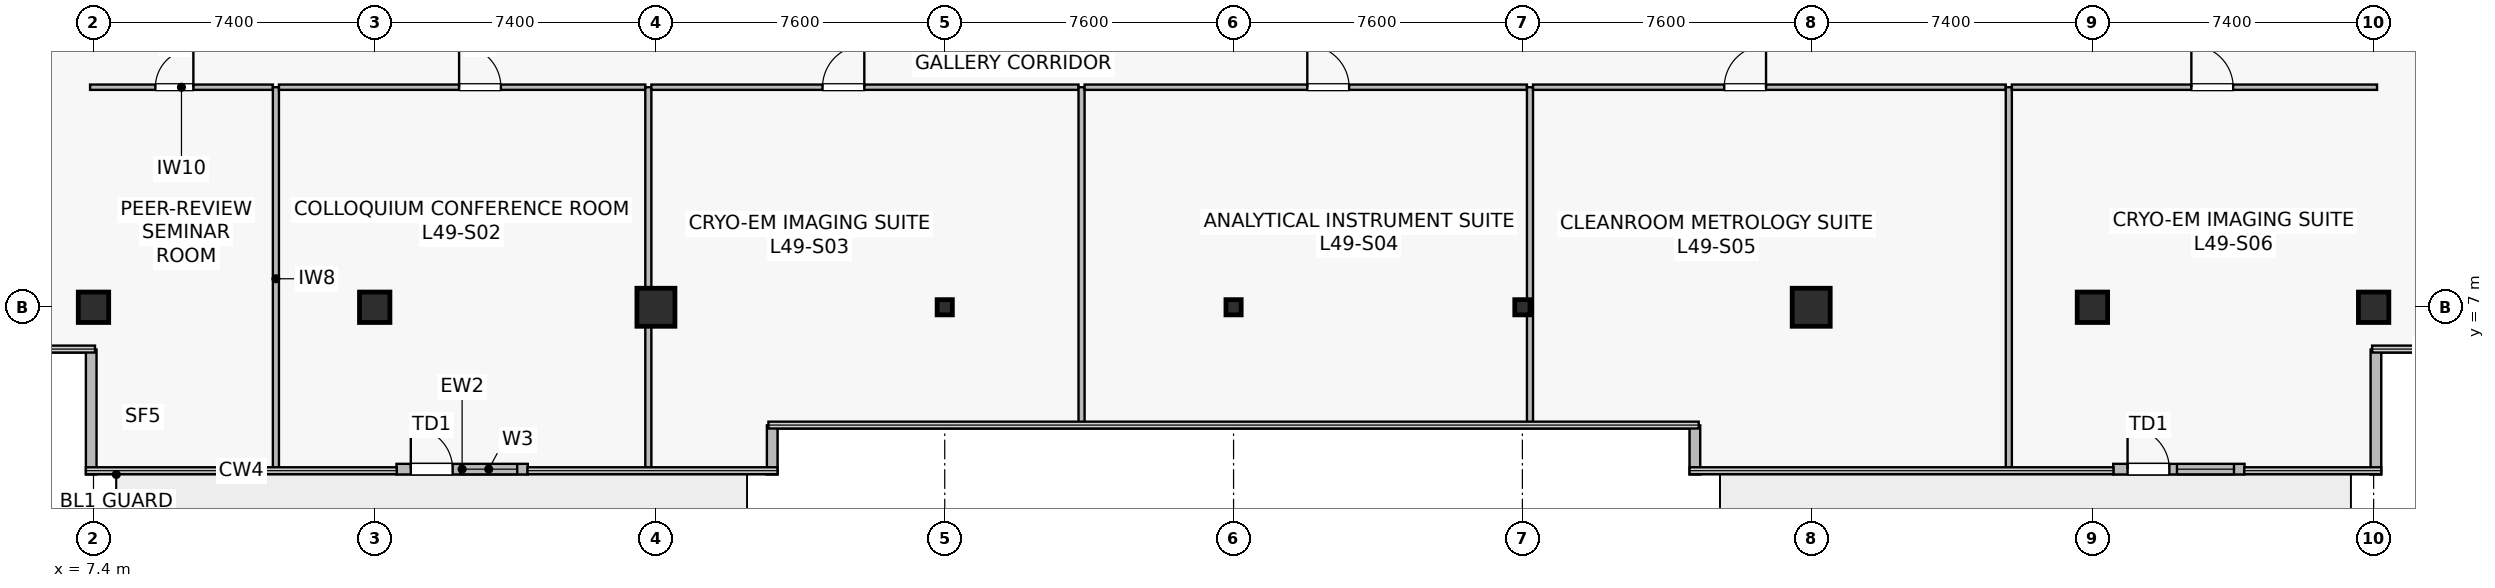
"""IFC4 building model, lengths in metres.
Left out: names, types, materials, properties, quantities, classifications, styles, units other than length and angle.
Written with IfcOpenShell. Run it as: python <this file> out.ifc"""

import sys

from ifc_helpers import new_model, si_unit, direction, frame, frame_2d, origin, origin_2d, place, context, subcontext, project, spatial, rectangle, hollow_rectangle, extrude, source, transform, mapped, element, fill, save


model = new_model("IFC4")
c1 = context("Model", 3, precision=1e-05, world=origin(), true_north=direction((0.0, 1.0)))
c2 = subcontext(c1, "Body", "Model", "MODEL_VIEW")
j1 = project(units=[si_unit("LENGTHUNIT", "METRE"), si_unit("PLANEANGLEUNIT", "RADIAN")], contexts=[c1])
p1 = place(None, origin())
s1 = spatial("IfcSite", under=j1, at=p1, CompositionType="ELEMENT")
p2 = place(p1, origin())
s2 = spatial("IfcBuilding", under=s1, at=p2, CompositionType="ELEMENT")
p3 = place(p2, frame((0.0, 0.0, 205.5)))
s3 = spatial("IfcBuildingStorey", under=s2, at=p3, CompositionType="ELEMENT", Elevation=205.5)
m1 = source(origin(), c2, "Body", "SweptSolid", [
    extrude(rectangle(XDim=0.8, YDim=0.8, at=origin_2d()), origin(), (0.0, 0.0, 1.0), 4.1),
])
p4 = place(p3, frame((14.8, 7.0, 0.0), z_axis=(0.0, 0.0, 1.0), x_axis=(1.0, 0.0, 0.0)))
e1 = element("IfcColumn", 1, at=p4, inside=s3, PredefinedType="COLUMN", context=c2, shape_type="MappedRepresentation", body=[
    mapped(m1, transform((0.0, 0.0, 0.0), scale=1.0)),
])
m2 = source(origin(), c2, "Body", "SweptSolid", [
    extrude(rectangle(XDim=1.0, YDim=1.0, at=origin_2d()), origin(), (0.0, 0.0, 1.0), 4.1),
])
for number, where, z_axis, x_axis in (
    (2, (22.2, 7.0, 0.0), (0.0, 0.0, 1.0), (1.0, 0.0, 0.0)),
    (3, (52.6, 7.0, 0.0), (0.0, 0.0, 1.0), (1.0, 0.0, 0.0)),
):
    element("IfcColumn", number, at=place(p3, frame(where, z_axis=z_axis, x_axis=x_axis)), inside=s3, PredefinedType="COLUMN", context=c2, shape_type="MappedRepresentation", body=[
        mapped(m2, transform((0.0, 0.0, 0.0), scale=1.0)),
    ])
for number, where, z_axis, x_axis in (
    (4, (60.0, 7.0, 0.0), (0.0, 0.0, 1.0), (1.0, 0.0, 0.0)),
    (5, (7.4, 7.0, 0.0), (0.0, 0.0, 1.0), (1.0, 0.0, 0.0)),
    (6, (67.4, 7.0, 0.0), (0.0, 0.0, 1.0), (1.0, 0.0, 0.0)),
):
    element("IfcColumn", number, at=place(p3, frame(where, z_axis=z_axis, x_axis=x_axis)), inside=s3, PredefinedType="COLUMN", context=c2, shape_type="MappedRepresentation", body=[
        mapped(m1, transform((0.0, 0.0, 0.0), scale=1.0)),
    ])
m3 = source(origin(), c2, "Body", "SweptSolid", [
    extrude(hollow_rectangle(XDim=0.4, YDim=0.4, WallThickness=0.019, at=origin_2d()), origin(), (0.0, 0.0, 1.0), 4.1),
])
for number, where, z_axis, x_axis in (
    (7, (29.8, 7.0, 0.0), (0.0, 0.0, 1.0), (1.0, 0.0, 0.0)),
    (8, (37.4, 7.0, 0.0), (0.0, 0.0, 1.0), (1.0, 0.0, 0.0)),
    (9, (45.0, 7.0, 0.0), (0.0, 0.0, 1.0), (1.0, 0.0, 0.0)),
):
    element("IfcColumn", number, at=place(p3, frame(where, z_axis=z_axis, x_axis=x_axis)), inside=s3, PredefinedType="COLUMN", context=c2, shape_type="MappedRepresentation", body=[
        mapped(m3, transform((0.0, 0.0, 0.0), scale=1.0)),
    ])
p5 = place(p3, frame((15.372, 2.74, 0.0), z_axis=(0.0, 0.0, 1.0), x_axis=(1.0, 0.0, 0.0)))
e10 = element("IfcWall", 10, at=p5, inside=s3, PredefinedType="STANDARD", context=c2, shape_type="SweptSolid", body=[
    extrude(rectangle(XDim=3.456, YDim=0.28, at=frame_2d((1.728, 0.0))), origin(), (0.0, 0.0, 1.0), 3.8),
])
p6 = place(p5, frame((0.378, 0.0, 0.0)))
e11 = element("IfcOpeningElement", 11, at=p6, cuts=e10, PredefinedType="OPENING", context=c2, shape_type="SweptSolid", body=[
    extrude(rectangle(XDim=1.1, YDim=2.2, at=frame_2d((0.55, 1.1))), frame((0.0, 0.15, 0.0), z_axis=(0.0, -1.0, 0.0), x_axis=(1.0, 0.0, 0.0)), (0.0, 0.0, 1.0), 0.3),
])
p7 = place(p5, frame((1.678, 0.0, 0.9)))
e12 = element("IfcOpeningElement", 12, at=p7, cuts=e10, PredefinedType="OPENING", context=c2, shape_type="SweptSolid", body=[
    extrude(rectangle(XDim=1.5, YDim=2.2, at=frame_2d((0.75, 1.1))), frame((0.0, 0.15, 0.0), z_axis=(0.0, -1.0, 0.0), x_axis=(1.0, 0.0, 0.0)), (0.0, 0.0, 1.0), 0.3),
])
p8 = place(p3, frame((60.547, 2.74, 0.0), z_axis=(0.0, 0.0, 1.0), x_axis=(1.0, 0.0, 0.0)))
e13 = element("IfcWall", 13, at=p8, inside=s3, PredefinedType="STANDARD", context=c2, shape_type="SweptSolid", body=[
    extrude(rectangle(XDim=3.456, YDim=0.28, at=frame_2d((1.728, 0.0))), origin(), (0.0, 0.0, 1.0), 3.8),
])
p9 = place(p8, frame((0.378, 0.0, 0.0)))
e14 = element("IfcOpeningElement", 14, at=p9, cuts=e13, PredefinedType="OPENING", context=c2, shape_type="SweptSolid", body=[
    extrude(rectangle(XDim=1.1, YDim=2.2, at=frame_2d((0.55, 1.1))), frame((0.0, 0.15, 0.0), z_axis=(0.0, -1.0, 0.0), x_axis=(1.0, 0.0, 0.0)), (0.0, 0.0, 1.0), 0.3),
])
p10 = place(p8, frame((1.678, 0.0, 0.9)))
e15 = element("IfcOpeningElement", 15, at=p10, cuts=e13, PredefinedType="OPENING", context=c2, shape_type="SweptSolid", body=[
    extrude(rectangle(XDim=1.5, YDim=2.2, at=frame_2d((0.75, 1.1))), frame((0.0, 0.15, 0.0), z_axis=(0.0, -1.0, 0.0), x_axis=(1.0, 0.0, 0.0)), (0.0, 0.0, 1.0), 0.3),
])
for number, where, z_axis, x_axis in (
    (16, (25.26, 2.6, 0.0), (0.0, 0.0, 1.0), (0.0, 1.0, 0.0)),
    (17, (49.54, 3.893, 0.0), (0.0, 0.0, 1.0), (0.0, -1.0, 0.0)),
):
    element("IfcWall", number, at=place(p3, frame(where, z_axis=z_axis, x_axis=x_axis)), inside=s3, PredefinedType="STANDARD", context=c2, shape_type="SweptSolid", body=[
        extrude(rectangle(XDim=1.293, YDim=0.28, at=frame_2d((0.646, 0.0))), origin(), (0.0, 0.0, 1.0), 3.8),
    ])
for number, where, z_axis, x_axis in (
    (18, (67.46, 2.6, 0.0), (0.0, 0.0, 1.0), (0.0, 1.0, 0.0)),
    (19, (7.34, 5.888, 0.0), (0.0, 0.0, 1.0), (0.0, -1.0, 0.0)),
):
    element("IfcWall", number, at=place(p3, frame(where, z_axis=z_axis, x_axis=x_axis)), inside=s3, PredefinedType="STANDARD", context=c2, shape_type="SweptSolid", body=[
        extrude(rectangle(XDim=3.288, YDim=0.28, at=frame_2d((1.644, 0.0))), origin(), (0.0, 0.0, 1.0), 3.8),
    ])
p11 = place(p3, frame((7.31, 12.79, 0.0), z_axis=(0.0, 0.0, 1.0), x_axis=(1.0, 0.0, 0.0)))
e20 = element("IfcWall", 20, at=p11, inside=s3, PredefinedType="PARTITIONING", context=c2, shape_type="SweptSolid", body=[
    extrude(rectangle(XDim=4.81, YDim=0.14, at=frame_2d((2.405, 0.0))), origin(), (0.0, 0.0, 1.0), 3.335),
])
p12 = place(p11, frame((1.719, 0.0, 0.0)))
e21 = element("IfcOpeningElement", 21, at=p12, cuts=e20, PredefinedType="OPENING", context=c2, shape_type="SweptSolid", body=[
    extrude(rectangle(XDim=1.0, YDim=2.15, at=frame_2d((0.5, 1.075))), frame((0.0, 0.08, 0.0), z_axis=(0.0, -1.0, 0.0), x_axis=(1.0, 0.0, 0.0)), (0.0, 0.0, 1.0), 0.16),
])
p13 = place(p3, frame((12.2, 2.71, 0.0), z_axis=(0.0, 0.0, 1.0), x_axis=(0.0, 1.0, 0.0)))
e22 = element("IfcWall", 22, at=p13, inside=s3, PredefinedType="PARTITIONING", context=c2, shape_type="SweptSolid", body=[
    extrude(rectangle(XDim=10.08, YDim=0.16, at=frame_2d((5.04, 0.0))), origin(), (0.0, 0.0, 1.0), 3.135),
])
p14 = place(p3, frame((12.28, 12.79, 0.0), z_axis=(0.0, 0.0, 1.0), x_axis=(1.0, 0.0, 0.0)))
e23 = element("IfcWall", 23, at=p14, inside=s3, PredefinedType="PARTITIONING", context=c2, shape_type="SweptSolid", body=[
    extrude(rectangle(XDim=9.64, YDim=0.14, at=frame_2d((4.82, 0.0))), origin(), (0.0, 0.0, 1.0), 3.197),
])
p15 = place(p14, frame((4.74, 0.0, 0.0)))
e24 = element("IfcOpeningElement", 24, at=p15, cuts=e23, PredefinedType="OPENING", context=c2, shape_type="SweptSolid", body=[
    extrude(rectangle(XDim=1.1, YDim=2.18, at=frame_2d((0.55, 1.09))), frame((0.0, 0.08, 0.0), z_axis=(0.0, -1.0, 0.0), x_axis=(1.0, 0.0, 0.0)), (0.0, 0.0, 1.0), 0.16),
])
p16 = place(p3, frame((22.0, 2.71, 0.0), z_axis=(0.0, 0.0, 1.0), x_axis=(0.0, 1.0, 0.0)))
e25 = element("IfcWall", 25, at=p16, inside=s3, PredefinedType="PARTITIONING", context=c2, shape_type="SweptSolid", body=[
    extrude(rectangle(XDim=10.08, YDim=0.16, at=frame_2d((5.04, 0.0))), origin(), (0.0, 0.0, 1.0), 3.135),
])
p17 = place(p3, frame((22.08, 12.79, 0.0), z_axis=(0.0, 0.0, 1.0), x_axis=(1.0, 0.0, 0.0)))
e26 = element("IfcWall", 26, at=p17, inside=s3, PredefinedType="PARTITIONING", context=c2, shape_type="SweptSolid", body=[
    extrude(rectangle(XDim=11.24, YDim=0.14, at=frame_2d((5.62, 0.0))), origin(), (0.0, 0.0, 1.0), 3.197),
])
p18 = place(p17, frame((4.504, 0.0, 0.0)))
e27 = element("IfcOpeningElement", 27, at=p18, cuts=e26, PredefinedType="OPENING", context=c2, shape_type="SweptSolid", body=[
    extrude(rectangle(XDim=1.1, YDim=2.18, at=frame_2d((0.55, 1.09))), frame((0.0, 0.08, 0.0), z_axis=(0.0, -1.0, 0.0), x_axis=(1.0, 0.0, 0.0)), (0.0, 0.0, 1.0), 0.16),
])
p19 = place(p3, frame((33.4, 3.91, 0.0), z_axis=(0.0, 0.0, 1.0), x_axis=(0.0, 1.0, 0.0)))
e28 = element("IfcWall", 28, at=p19, inside=s3, PredefinedType="PARTITIONING", context=c2, shape_type="SweptSolid", body=[
    extrude(rectangle(XDim=8.88, YDim=0.16, at=frame_2d((4.44, 0.0))), origin(), (0.0, 0.0, 1.0), 3.135),
])
p20 = place(p3, frame((33.48, 12.79, 0.0), z_axis=(0.0, 0.0, 1.0), x_axis=(1.0, 0.0, 0.0)))
e29 = element("IfcWall", 29, at=p20, inside=s3, PredefinedType="PARTITIONING", context=c2, shape_type="SweptSolid", body=[
    extrude(rectangle(XDim=11.64, YDim=0.14, at=frame_2d((5.82, 0.0))), origin(), (0.0, 0.0, 1.0), 3.197),
])
p21 = place(p20, frame((5.86, 0.0, 0.0)))
e30 = element("IfcOpeningElement", 30, at=p21, cuts=e29, PredefinedType="OPENING", context=c2, shape_type="SweptSolid", body=[
    extrude(rectangle(XDim=1.1, YDim=2.18, at=frame_2d((0.55, 1.09))), frame((0.0, 0.08, 0.0), z_axis=(0.0, -1.0, 0.0), x_axis=(1.0, 0.0, 0.0)), (0.0, 0.0, 1.0), 0.16),
])
p22 = place(p3, frame((45.2, 3.91, 0.0), z_axis=(0.0, 0.0, 1.0), x_axis=(0.0, 1.0, 0.0)))
e31 = element("IfcWall", 31, at=p22, inside=s3, PredefinedType="PARTITIONING", context=c2, shape_type="SweptSolid", body=[
    extrude(rectangle(XDim=8.88, YDim=0.16, at=frame_2d((4.44, 0.0))), origin(), (0.0, 0.0, 1.0), 3.135),
])
p23 = place(p3, frame((45.28, 12.79, 0.0), z_axis=(0.0, 0.0, 1.0), x_axis=(1.0, 0.0, 0.0)))
e32 = element("IfcWall", 32, at=p23, inside=s3, PredefinedType="PARTITIONING", context=c2, shape_type="SweptSolid", body=[
    extrude(rectangle(XDim=12.44, YDim=0.14, at=frame_2d((6.22, 0.0))), origin(), (0.0, 0.0, 1.0), 3.197),
])
p24 = place(p23, frame((5.031, 0.0, 0.0)))
e33 = element("IfcOpeningElement", 33, at=p24, cuts=e32, PredefinedType="OPENING", context=c2, shape_type="SweptSolid", body=[
    extrude(rectangle(XDim=1.1, YDim=2.18, at=frame_2d((0.55, 1.09))), frame((0.0, 0.08, 0.0), z_axis=(0.0, -1.0, 0.0), x_axis=(1.0, 0.0, 0.0)), (0.0, 0.0, 1.0), 0.16),
])
p25 = place(p3, frame((57.8, 2.71, 0.0), z_axis=(0.0, 0.0, 1.0), x_axis=(0.0, 1.0, 0.0)))
e34 = element("IfcWall", 34, at=p25, inside=s3, PredefinedType="PARTITIONING", context=c2, shape_type="SweptSolid", body=[
    extrude(rectangle(XDim=10.08, YDim=0.16, at=frame_2d((5.04, 0.0))), origin(), (0.0, 0.0, 1.0), 3.135),
])
p26 = place(p3, frame((57.88, 12.79, 0.0), z_axis=(0.0, 0.0, 1.0), x_axis=(1.0, 0.0, 0.0)))
e35 = element("IfcWall", 35, at=p26, inside=s3, PredefinedType="PARTITIONING", context=c2, shape_type="SweptSolid", body=[
    extrude(rectangle(XDim=9.61, YDim=0.14, at=frame_2d((4.805, 0.0))), origin(), (0.0, 0.0, 1.0), 3.197),
])
p27 = place(p26, frame((4.724, 0.0, 0.0)))
e36 = element("IfcOpeningElement", 36, at=p27, cuts=e35, PredefinedType="OPENING", context=c2, shape_type="SweptSolid", body=[
    extrude(rectangle(XDim=1.1, YDim=2.18, at=frame_2d((0.55, 1.09))), frame((0.0, 0.08, 0.0), z_axis=(0.0, -1.0, 0.0), x_axis=(1.0, 0.0, 0.0)), (0.0, 0.0, 1.0), 0.16),
])
m4 = source(origin(), c2, "Body", "SweptSolid", [
    extrude(rectangle(XDim=1.1, YDim=2.2, at=frame_2d((0.55, 1.1))), frame((0.0, 0.025, 0.0), z_axis=(0.0, -1.0, 0.0), x_axis=(1.0, 0.0, 0.0)), (0.0, 0.0, 1.0), 0.05),
])
p28 = place(p6, origin())
e37 = element("IfcDoor", 37, at=p28, inside=s3, OperationType="SINGLE_SWING_LEFT", PredefinedType="DOOR", context=c2, shape_type="MappedRepresentation", body=[
    mapped(m4, transform((0.0, 0.0, 0.0), scale=1.0)),
])
fill(e11, e37)
m5 = source(origin(), c2, "Body", "SweptSolid", [
    extrude(rectangle(XDim=1.5, YDim=2.2, at=frame_2d((0.75, 1.1))), frame((0.0, 0.03, 0.0), z_axis=(0.0, -1.0, 0.0), x_axis=(1.0, 0.0, 0.0)), (0.0, 0.0, 1.0), 0.06),
])
p29 = place(p7, origin())
e38 = element("IfcWindow", 38, at=p29, inside=s3, PartitioningType="SINGLE_PANEL", PredefinedType="WINDOW", context=c2, shape_type="MappedRepresentation", body=[
    mapped(m5, transform((0.0, 0.0, 0.0), scale=1.0)),
])
fill(e12, e38)
p30 = place(p9, origin())
e39 = element("IfcDoor", 39, at=p30, inside=s3, OperationType="SINGLE_SWING_LEFT", PredefinedType="DOOR", context=c2, shape_type="MappedRepresentation", body=[
    mapped(m4, transform((0.0, 0.0, 0.0), scale=1.0)),
])
fill(e14, e39)
p31 = place(p10, origin())
e40 = element("IfcWindow", 40, at=p31, inside=s3, PartitioningType="SINGLE_PANEL", PredefinedType="WINDOW", context=c2, shape_type="MappedRepresentation", body=[
    mapped(m5, transform((0.0, 0.0, 0.0), scale=1.0)),
])
fill(e15, e40)
m6 = source(origin(), c2, "Body", "SweptSolid", [
    extrude(rectangle(XDim=1.0, YDim=2.15, at=frame_2d((0.5, 1.075))), frame((0.0, 0.025, 0.0), z_axis=(0.0, -1.0, 0.0), x_axis=(1.0, 0.0, 0.0)), (0.0, 0.0, 1.0), 0.05),
])
p32 = place(p12, origin())
e41 = element("IfcDoor", 41, at=p32, inside=s3, OperationType="SINGLE_SWING_RIGHT", PredefinedType="DOOR", context=c2, shape_type="MappedRepresentation", body=[
    mapped(m6, transform((0.0, 0.0, 0.0), scale=1.0)),
])
fill(e21, e41)
m7 = source(origin(), c2, "Body", "SweptSolid", [
    extrude(rectangle(XDim=1.1, YDim=2.18, at=frame_2d((0.55, 1.09))), frame((0.0, 0.025, 0.0), z_axis=(0.0, -1.0, 0.0), x_axis=(1.0, 0.0, 0.0)), (0.0, 0.0, 1.0), 0.05),
])
p33 = place(p15, origin())
e42 = element("IfcDoor", 42, at=p33, inside=s3, OperationType="SINGLE_SWING_LEFT", PredefinedType="DOOR", context=c2, shape_type="MappedRepresentation", body=[
    mapped(m7, transform((0.0, 0.0, 0.0), scale=1.0)),
])
fill(e24, e42)
p34 = place(p18, origin())
e43 = element("IfcDoor", 43, at=p34, inside=s3, OperationType="SINGLE_SWING_RIGHT", PredefinedType="DOOR", context=c2, shape_type="MappedRepresentation", body=[
    mapped(m7, transform((0.0, 0.0, 0.0), scale=1.0)),
])
fill(e27, e43)
p35 = place(p21, origin())
e44 = element("IfcDoor", 44, at=p35, inside=s3, OperationType="SINGLE_SWING_LEFT", PredefinedType="DOOR", context=c2, shape_type="MappedRepresentation", body=[
    mapped(m7, transform((0.0, 0.0, 0.0), scale=1.0)),
])
fill(e30, e44)
p36 = place(p24, origin())
e45 = element("IfcDoor", 45, at=p36, inside=s3, OperationType="SINGLE_SWING_RIGHT", PredefinedType="DOOR", context=c2, shape_type="MappedRepresentation", body=[
    mapped(m7, transform((0.0, 0.0, 0.0), scale=1.0)),
])
fill(e33, e45)
p37 = place(p27, origin())
e46 = element("IfcDoor", 46, at=p37, inside=s3, OperationType="SINGLE_SWING_LEFT", PredefinedType="DOOR", context=c2, shape_type="MappedRepresentation", body=[
    mapped(m7, transform((0.0, 0.0, 0.0), scale=1.0)),
])
fill(e36, e46)
save(model, sys.argv[1])
